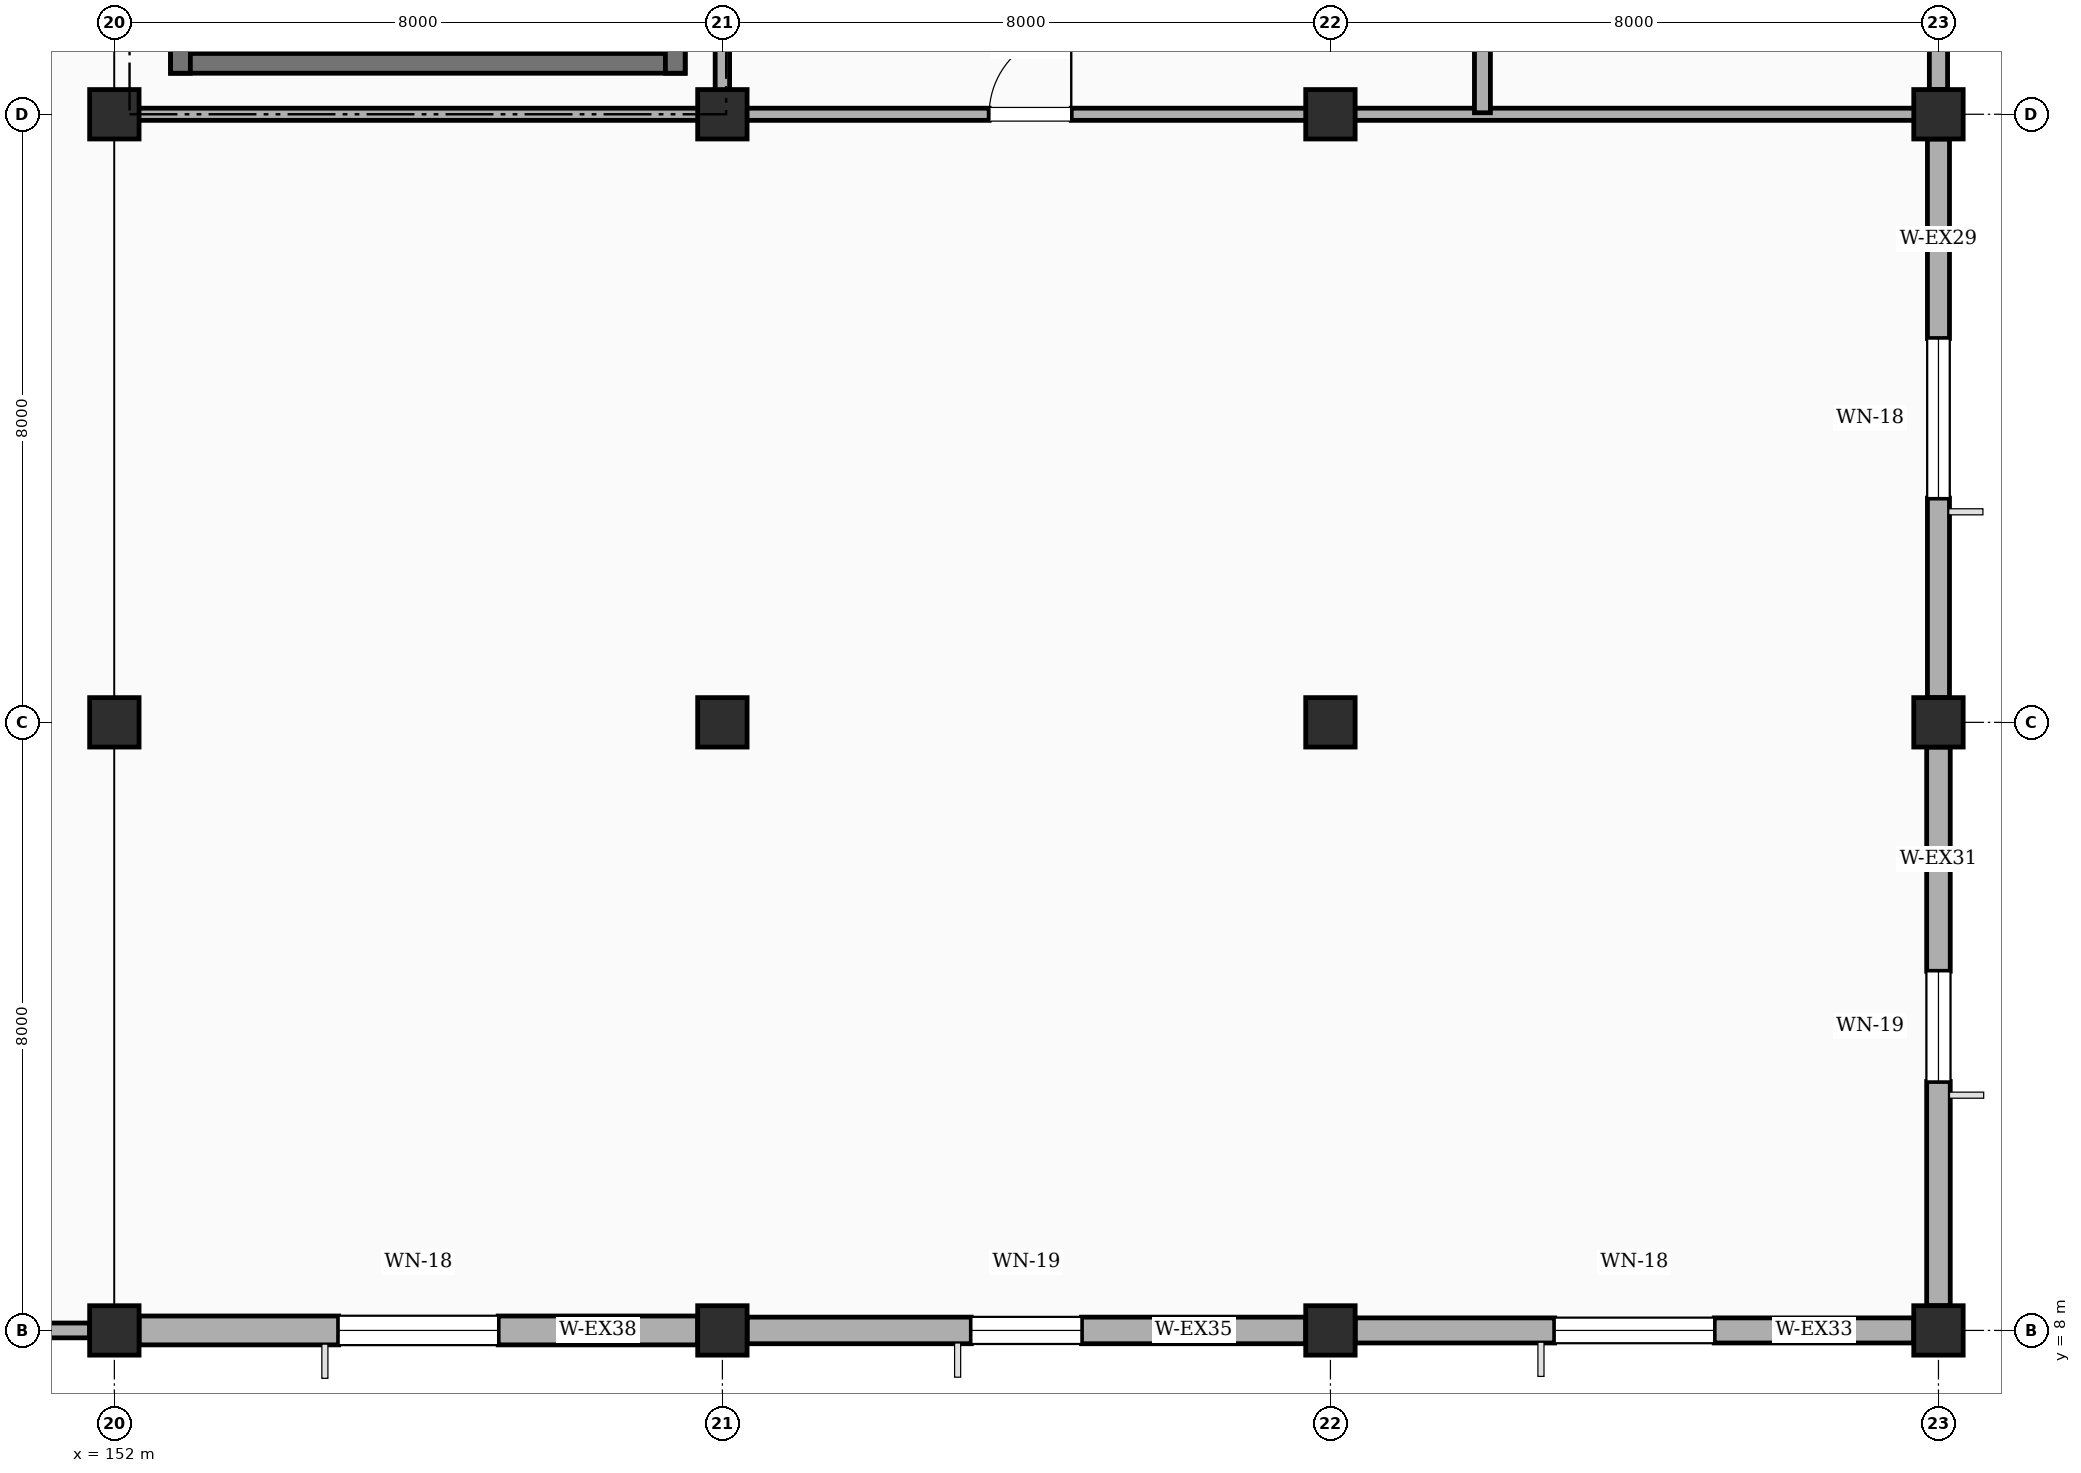
"""IFC4 building model, lengths in metres.
Left out: names, types, materials, properties, quantities, classifications, styles, units other than length and angle.
Written with IfcOpenShell. Run it as: python <this file> out.ifc"""

import sys

from ifc_helpers import new_model, si_unit, direction, frame, frame_2d, origin, origin_2d, place, context, subcontext, project, spatial, rectangle, extrude, element, fill, save


model = new_model("IFC4")
c1 = context("Model", 3, precision=1e-05, world=origin(), true_north=direction((0.0, 1.0)))
c2 = subcontext(c1, "Body", "Model", "MODEL_VIEW")
j1 = project(units=[si_unit("LENGTHUNIT", "METRE"), si_unit("PLANEANGLEUNIT", "RADIAN")], contexts=[c1])
p1 = place(None, origin())
s1 = spatial("IfcSite", under=j1, at=p1, CompositionType="ELEMENT")
p2 = place(p1, origin())
s2 = spatial("IfcBuilding", under=s1, at=p2, CompositionType="ELEMENT")
p3 = place(p2, frame((0.0, 0.0, 15.0)))
s3 = spatial("IfcBuildingStorey", under=s2, at=p3, CompositionType="ELEMENT", Elevation=15.0)
for number, where, z_axis, x_axis in (
    (1, (152.0, 8.0, 0.0), (0.0, 0.0, 1.0), (1.0, 0.0, 0.0)),
    (2, (152.0, 16.0, 0.0), (0.0, 0.0, 1.0), (1.0, 0.0, 0.0)),
    (3, (152.0, 24.0, 0.0), (0.0, 0.0, 1.0), (1.0, 0.0, 0.0)),
    (4, (160.0, 8.0, 0.0), (0.0, 0.0, 1.0), (1.0, 0.0, 0.0)),
    (5, (160.0, 16.0, 0.0), (0.0, 0.0, 1.0), (1.0, 0.0, 0.0)),
    (6, (160.0, 24.0, 0.0), (0.0, 0.0, 1.0), (1.0, 0.0, 0.0)),
    (7, (168.0, 8.0, 0.0), (0.0, 0.0, 1.0), (1.0, 0.0, 0.0)),
    (8, (168.0, 16.0, 0.0), (0.0, 0.0, 1.0), (1.0, 0.0, 0.0)),
    (9, (168.0, 24.0, 0.0), (0.0, 0.0, 1.0), (1.0, 0.0, 0.0)),
    (10, (176.0, 8.0, 0.0), (0.0, 0.0, 1.0), (1.0, 0.0, 0.0)),
    (11, (176.0, 16.0, 0.0), (0.0, 0.0, 1.0), (1.0, 0.0, 0.0)),
    (12, (176.0, 24.0, 0.0), (0.0, 0.0, 1.0), (1.0, 0.0, 0.0)),
):
    element("IfcColumn", number, at=place(p3, frame(where, z_axis=z_axis, x_axis=x_axis)), inside=s3, PredefinedType="COLUMN", context=c2, shape_type="SweptSolid", body=[
        extrude(rectangle(XDim=0.65, YDim=0.65, at=origin_2d()), origin(), (0.0, 0.0, 1.0), 4.2),
    ])
p4 = place(p3, frame((144.325, 8.0, 0.0), z_axis=(0.0, 0.0, 1.0), x_axis=(1.0, 0.0, 0.0)))
e13 = element("IfcWall", 13, at=p4, inside=s3, PredefinedType="SOLIDWALL", context=c2, shape_type="SweptSolid", body=[
    extrude(rectangle(XDim=7.35, YDim=0.195, at=frame_2d((3.675, 0.0))), origin(), (0.0, 0.0, 1.0), 3.95),
])
p5 = place(p4, frame((2.95, 0.0, 1.15)))
e14 = element("IfcOpeningElement", 14, at=p5, cuts=e13, PredefinedType="OPENING", context=c2, shape_type="SweptSolid", body=[
    extrude(rectangle(XDim=1.45, YDim=1.4, at=frame_2d((0.725, 0.7))), frame((0.0, 0.107, 0.0), z_axis=(0.0, -1.0, 0.0), x_axis=(1.0, 0.0, 0.0)), (0.0, 0.0, 1.0), 0.215),
])
p6 = place(p3, frame((152.325, 8.0, 0.0), z_axis=(0.0, 0.0, 1.0), x_axis=(1.0, 0.0, 0.0)))
e15 = element("IfcWall", 15, at=p6, inside=s3, PredefinedType="STANDARD", context=c2, shape_type="SweptSolid", body=[
    extrude(rectangle(XDim=7.35, YDim=0.38, at=frame_2d((3.675, 0.0))), origin(), (0.0, 0.0, 1.0), 3.365),
])
p7 = place(p6, frame((2.625, 0.0, 1.15)))
e16 = element("IfcOpeningElement", 16, at=p7, cuts=e15, PredefinedType="OPENING", context=c2, shape_type="SweptSolid", body=[
    extrude(rectangle(XDim=2.1, YDim=1.4, at=frame_2d((1.05, 0.7))), frame((0.0, 0.2, 0.0), z_axis=(0.0, -1.0, 0.0), x_axis=(1.0, 0.0, 0.0)), (0.0, 0.0, 1.0), 0.4),
])
p8 = place(p3, frame((160.325, 8.0, 0.0), z_axis=(0.0, 0.0, 1.0), x_axis=(1.0, 0.0, 0.0)))
e17 = element("IfcWall", 17, at=p8, inside=s3, PredefinedType="STANDARD", context=c2, shape_type="SweptSolid", body=[
    extrude(rectangle(XDim=7.35, YDim=0.35, at=frame_2d((3.675, 0.0))), origin(), (0.0, 0.0, 1.0), 3.365),
])
p9 = place(p8, frame((2.95, 0.0, 1.15)))
e18 = element("IfcOpeningElement", 18, at=p9, cuts=e17, PredefinedType="OPENING", context=c2, shape_type="SweptSolid", body=[
    extrude(rectangle(XDim=1.45, YDim=1.4, at=frame_2d((0.725, 0.7))), frame((0.0, 0.185, 0.0), z_axis=(0.0, -1.0, 0.0), x_axis=(1.0, 0.0, 0.0)), (0.0, 0.0, 1.0), 0.37),
])
p10 = place(p3, frame((168.325, 8.0, 0.0), z_axis=(0.0, 0.0, 1.0), x_axis=(1.0, 0.0, 0.0)))
e19 = element("IfcWall", 19, at=p10, inside=s3, PredefinedType="STANDARD", context=c2, shape_type="SweptSolid", body=[
    extrude(rectangle(XDim=7.35, YDim=0.33, at=frame_2d((3.675, 0.0))), origin(), (0.0, 0.0, 1.0), 3.36),
])
p11 = place(p10, frame((2.625, 0.0, 1.15)))
e20 = element("IfcOpeningElement", 20, at=p11, cuts=e19, PredefinedType="OPENING", context=c2, shape_type="SweptSolid", body=[
    extrude(rectangle(XDim=2.1, YDim=1.4, at=frame_2d((1.05, 0.7))), frame((0.0, 0.175, 0.0), z_axis=(0.0, -1.0, 0.0), x_axis=(1.0, 0.0, 0.0)), (0.0, 0.0, 1.0), 0.35),
])
p12 = place(p3, frame((176.0, 8.325, 0.0), z_axis=(0.0, 0.0, 1.0), x_axis=(0.0, 1.0, 0.0)))
e21 = element("IfcWall", 21, at=p12, inside=s3, PredefinedType="STANDARD", context=c2, shape_type="SweptSolid", body=[
    extrude(rectangle(XDim=7.35, YDim=0.31, at=frame_2d((3.675, 0.0))), origin(), (0.0, 0.0, 1.0), 3.36),
])
p13 = place(p12, frame((2.95, 0.0, 1.15)))
e22 = element("IfcOpeningElement", 22, at=p13, cuts=e21, PredefinedType="OPENING", context=c2, shape_type="SweptSolid", body=[
    extrude(rectangle(XDim=1.45, YDim=1.4, at=frame_2d((0.725, 0.7))), frame((0.0, 0.165, 0.0), z_axis=(0.0, -1.0, 0.0), x_axis=(1.0, 0.0, 0.0)), (0.0, 0.0, 1.0), 0.33),
])
p14 = place(p3, frame((176.0, 16.325, 0.0), z_axis=(0.0, 0.0, 1.0), x_axis=(0.0, 1.0, 0.0)))
e23 = element("IfcWall", 23, at=p14, inside=s3, PredefinedType="STANDARD", context=c2, shape_type="SweptSolid", body=[
    extrude(rectangle(XDim=7.35, YDim=0.29, at=frame_2d((3.675, 0.0))), origin(), (0.0, 0.0, 1.0), 3.34),
])
p15 = place(p14, frame((2.625, 0.0, 1.15)))
e24 = element("IfcOpeningElement", 24, at=p15, cuts=e23, PredefinedType="OPENING", context=c2, shape_type="SweptSolid", body=[
    extrude(rectangle(XDim=2.1, YDim=1.4, at=frame_2d((1.05, 0.7))), frame((0.0, 0.155, 0.0), z_axis=(0.0, -1.0, 0.0), x_axis=(1.0, 0.0, 0.0)), (0.0, 0.0, 1.0), 0.31),
])
p16 = place(p3, frame((176.0, 24.325, 0.0), z_axis=(0.0, 0.0, 1.0), x_axis=(0.0, 1.0, 0.0)))
e25 = element("IfcWall", 25, at=p16, inside=s3, PredefinedType="SOLIDWALL", context=c2, shape_type="SweptSolid", body=[
    extrude(rectangle(XDim=7.35, YDim=0.24, at=frame_2d((3.675, 0.0))), origin(), (0.0, 0.0, 1.0), 3.34),
])
p17 = place(p16, frame((2.95, 0.0, 1.15)))
e26 = element("IfcOpeningElement", 26, at=p17, cuts=e25, PredefinedType="OPENING", context=c2, shape_type="SweptSolid", body=[
    extrude(rectangle(XDim=1.45, YDim=1.4, at=frame_2d((0.725, 0.7))), frame((0.0, 0.13, 0.0), z_axis=(0.0, -1.0, 0.0), x_axis=(1.0, 0.0, 0.0)), (0.0, 0.0, 1.0), 0.26),
])
p18 = place(p3, frame((159.51, 24.67, 0.0), z_axis=(0.0, 0.0, 1.0), x_axis=(-1.0, 0.0, 0.0)))
e27 = element("IfcWall", 27, at=p18, inside=s3, PredefinedType="SHEAR", context=c2, shape_type="SweptSolid", body=[
    extrude(rectangle(XDim=6.77, YDim=0.26, at=frame_2d((3.385, 0.0))), origin(), (0.0, 0.0, 1.0), 4.2),
])
p19 = place(p3, frame((152.87, 24.54, 0.0), z_axis=(0.0, 0.0, 1.0), x_axis=(0.0, 1.0, 0.0)))
e28 = element("IfcWall", 28, at=p19, inside=s3, PredefinedType="SHEAR", context=c2, shape_type="SweptSolid", body=[
    extrude(rectangle(XDim=3.86, YDim=0.26, at=frame_2d((1.93, 0.0))), origin(), (0.0, 0.0, 1.0), 4.2),
])
p20 = place(p19, frame((1.46, 0.0, 0.0)))
e29 = element("IfcOpeningElement", 29, at=p20, cuts=e28, PredefinedType="OPENING", context=c2, shape_type="SweptSolid", body=[
    extrude(rectangle(XDim=1.7, YDim=2.2, at=frame_2d((0.85, 1.1))), frame((0.0, 0.14, 0.0), z_axis=(0.0, -1.0, 0.0), x_axis=(1.0, 0.0, 0.0)), (0.0, 0.0, 1.0), 0.28),
])
p21 = place(p3, frame((159.38, 24.54, 0.0), z_axis=(0.0, 0.0, 1.0), x_axis=(0.0, 1.0, 0.0)))
e30 = element("IfcWall", 30, at=p21, inside=s3, PredefinedType="SHEAR", context=c2, shape_type="SweptSolid", body=[
    extrude(rectangle(XDim=3.86, YDim=0.26, at=frame_2d((1.93, 0.0))), origin(), (0.0, 0.0, 1.0), 4.2),
])
p22 = place(p3, frame((152.22, 24.0, 0.0), z_axis=(0.0, 0.0, 1.0), x_axis=(1.0, 0.0, 0.0)))
e31 = element("IfcWall", 31, at=p22, inside=s3, PredefinedType="PARTITIONING", context=c2, shape_type="SweptSolid", body=[
    extrude(rectangle(XDim=23.66, YDim=0.16, at=frame_2d((11.83, 0.0))), origin(), (0.0, 0.0, 1.0), 3.31),
])
p23 = place(p22, frame((11.29, 0.0, 0.0)))
e32 = element("IfcOpeningElement", 32, at=p23, cuts=e31, PredefinedType="OPENING", context=c2, shape_type="SweptSolid", body=[
    extrude(rectangle(XDim=1.08, YDim=2.15, at=frame_2d((0.54, 1.075))), frame((0.0, 0.09, 0.0), z_axis=(0.0, -1.0, 0.0), x_axis=(1.0, 0.0, 0.0)), (0.0, 0.0, 1.0), 0.18),
])
p24 = place(p3, frame((160.0, 24.02, 0.0), z_axis=(0.0, 0.0, 1.0), x_axis=(0.0, 1.0, 0.0)))
e33 = element("IfcWall", 33, at=p24, inside=s3, PredefinedType="SOLIDWALL", context=c2, shape_type="SweptSolid", body=[
    extrude(rectangle(XDim=19.16, YDim=0.19, at=frame_2d((9.58, 0.0))), origin(), (0.0, 0.0, 1.0), 3.31),
])
p25 = place(p3, frame((170.0, 24.02, 0.0), z_axis=(0.0, 0.0, 1.0), x_axis=(0.0, 1.0, 0.0)))
e34 = element("IfcWall", 34, at=p25, inside=s3, PredefinedType="SOLIDWALL", context=c2, shape_type="SweptSolid", body=[
    extrude(rectangle(XDim=23.96, YDim=0.21, at=frame_2d((11.98, 0.0))), origin(), (0.0, 0.0, 1.0), 3.31),
])
p26 = place(p25, frame((11.38, 0.0, 0.0)))
e35 = element("IfcOpeningElement", 35, at=p26, cuts=e34, PredefinedType="OPENING", context=c2, shape_type="SweptSolid", body=[
    extrude(rectangle(XDim=1.2, YDim=2.15, at=frame_2d((0.6, 1.075))), frame((0.0, 0.115, 0.0), z_axis=(0.0, -1.0, 0.0), x_axis=(1.0, 0.0, 0.0)), (0.0, 0.0, 1.0), 0.23),
])
p27 = place(p7, origin())
e36 = element("IfcWindow", 36, at=p27, inside=s3, PartitioningType="SINGLE_PANEL", PredefinedType="WINDOW", context=c2, shape_type="SweptSolid", body=[
    extrude(rectangle(XDim=2.1, YDim=1.4, at=frame_2d((1.05, 0.7))), frame((0.0, 0.03, 0.0), z_axis=(0.0, -1.0, 0.0), x_axis=(1.0, 0.0, 0.0)), (0.0, 0.0, 1.0), 0.06),
])
fill(e16, e36)
p28 = place(p9, origin())
e37 = element("IfcWindow", 37, at=p28, inside=s3, PartitioningType="SINGLE_PANEL", PredefinedType="WINDOW", context=c2, shape_type="SweptSolid", body=[
    extrude(rectangle(XDim=1.45, YDim=1.4, at=frame_2d((0.725, 0.7))), frame((0.0, 0.03, 0.0), z_axis=(0.0, -1.0, 0.0), x_axis=(1.0, 0.0, 0.0)), (0.0, 0.0, 1.0), 0.06),
])
fill(e18, e37)
p29 = place(p11, origin())
e38 = element("IfcWindow", 38, at=p29, inside=s3, PartitioningType="SINGLE_PANEL", PredefinedType="WINDOW", context=c2, shape_type="SweptSolid", body=[
    extrude(rectangle(XDim=2.1, YDim=1.4, at=frame_2d((1.05, 0.7))), frame((0.0, 0.03, 0.0), z_axis=(0.0, -1.0, 0.0), x_axis=(1.0, 0.0, 0.0)), (0.0, 0.0, 1.0), 0.06),
])
fill(e20, e38)
p30 = place(p13, origin())
e39 = element("IfcWindow", 39, at=p30, inside=s3, PartitioningType="SINGLE_PANEL", PredefinedType="WINDOW", context=c2, shape_type="SweptSolid", body=[
    extrude(rectangle(XDim=1.45, YDim=1.4, at=frame_2d((0.725, 0.7))), frame((0.0, 0.03, 0.0), z_axis=(0.0, -1.0, 0.0), x_axis=(1.0, 0.0, 0.0)), (0.0, 0.0, 1.0), 0.06),
])
fill(e22, e39)
p31 = place(p15, origin())
e40 = element("IfcWindow", 40, at=p31, inside=s3, PartitioningType="SINGLE_PANEL", PredefinedType="WINDOW", context=c2, shape_type="SweptSolid", body=[
    extrude(rectangle(XDim=2.1, YDim=1.4, at=frame_2d((1.05, 0.7))), frame((0.0, 0.03, 0.0), z_axis=(0.0, -1.0, 0.0), x_axis=(1.0, 0.0, 0.0)), (0.0, 0.0, 1.0), 0.06),
])
fill(e24, e40)
p32 = place(p23, origin())
e41 = element("IfcDoor", 41, at=p32, inside=s3, OperationType="SINGLE_SWING_RIGHT", PredefinedType="DOOR", context=c2, shape_type="SweptSolid", body=[
    extrude(rectangle(XDim=1.08, YDim=2.15, at=frame_2d((0.54, 1.075))), frame((0.0, 0.025, 0.0), z_axis=(0.0, -1.0, 0.0), x_axis=(1.0, 0.0, 0.0)), (0.0, 0.0, 1.0), 0.05),
])
fill(e32, e41)
save(model, sys.argv[1])
